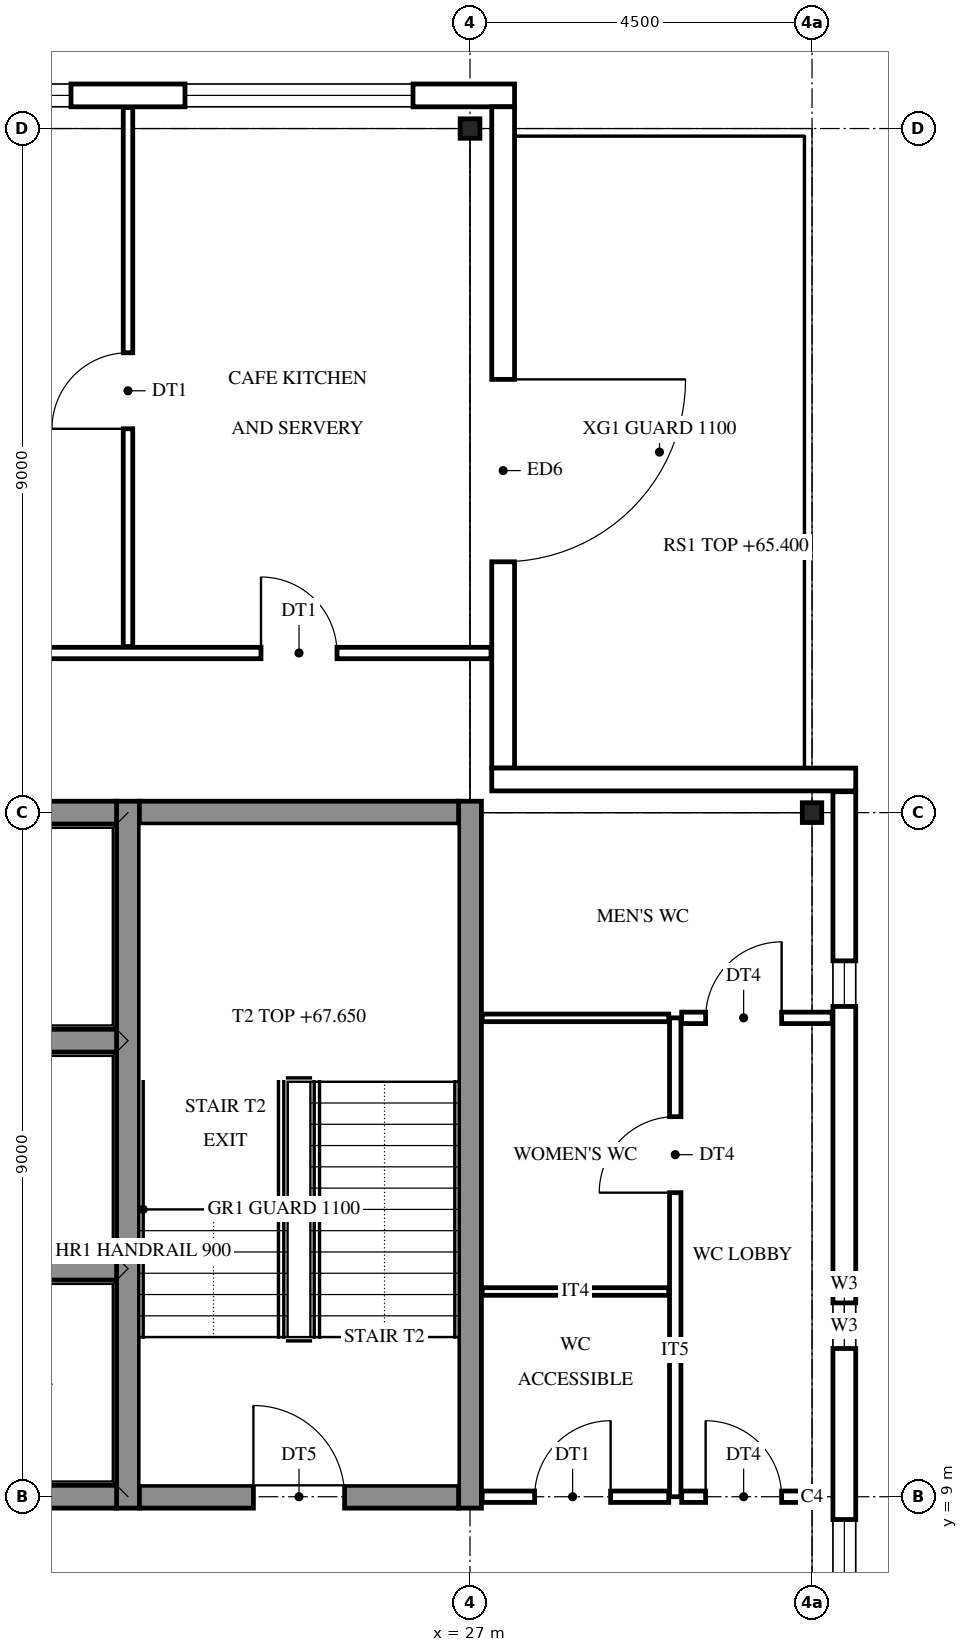
"""IFC4 building model, lengths in metres.
Left out: names, types, materials, properties, quantities, classifications, styles, units other than length and angle.
Written with IfcOpenShell. Run it as: python <this file> out.ifc"""

import sys

from ifc_helpers import new_model, si_unit, direction, frame, frame_2d, origin, origin_2d, place, context, subcontext, project, spatial, rectangle, i_section, extrude, element, fill, save


model = new_model("IFC4")
c1 = context("Model", 3, precision=1e-05, world=origin(), true_north=direction((0.0, 1.0)))
c2 = subcontext(c1, "Body", "Model", "MODEL_VIEW")
j1 = project(units=[si_unit("LENGTHUNIT", "METRE"), si_unit("PLANEANGLEUNIT", "RADIAN")], contexts=[c1])
p1 = place(None, origin())
s1 = spatial("IfcSite", under=j1, at=p1, CompositionType="ELEMENT")
p2 = place(p1, origin())
s2 = spatial("IfcBuilding", under=s1, at=p2, CompositionType="ELEMENT")
p3 = place(p2, frame((0.0, 0.0, 65.4)))
s3 = spatial("IfcBuildingStorey", under=s2, at=p3, CompositionType="ELEMENT", Elevation=65.4)
for number, where, z_axis, x_axis in (
    (1, (27.0, 27.0, 0.0), (0.0, 0.0, 1.0), (0.0, 1.0, 0.0)),
    (2, (31.5, 9.0, 0.0), (0.0, 0.0, 1.0), (1.0, 0.0, 0.0)),
    (3, (31.5, 18.0, 0.0), (0.0, 0.0, 1.0), (1.0, 0.0, 0.0)),
):
    element("IfcColumn", number, at=place(p3, frame(where, z_axis=z_axis, x_axis=x_axis)), inside=s3, PredefinedType="COLUMN", context=c2, shape_type="SweptSolid", body=[
        extrude(i_section(OverallWidth=0.256, OverallDepth=0.26, WebThickness=0.01, FlangeThickness=0.017, FilletRadius=0.014, at=origin_2d()), origin(), (0.0, 0.0, 1.0), 4.5),
    ])
for number, where, z_axis, x_axis in (
    (4, (22.5, 8.85, 0.0), (0.0, 0.0, 1.0), (0.0, 1.0, 0.0)),
    (5, (27.0, 8.85, 0.0), (0.0, 0.0, 1.0), (0.0, 1.0, 0.0)),
):
    element("IfcWall", number, at=place(p3, frame(where, z_axis=z_axis, x_axis=x_axis)), inside=s3, PredefinedType="SHEAR", context=c2, shape_type="SweptSolid", body=[
        extrude(rectangle(XDim=9.3, YDim=0.3, at=frame_2d((4.65, 0.0))), origin(), (0.0, 0.0, 1.0), 4.5),
    ])
p4 = place(p3, frame((19.65, 9.0, 0.0), z_axis=(0.0, 0.0, 1.0), x_axis=(1.0, 0.0, 0.0)))
e6 = element("IfcWall", 6, at=p4, inside=s3, PredefinedType="SHEAR", context=c2, shape_type="SweptSolid", body=[
    extrude(rectangle(XDim=2.7, YDim=0.3, at=frame_2d((1.35, 0.0))), origin(), (0.0, 0.0, 1.0), 4.5),
])
p5 = place(p3, frame((22.65, 9.0, 0.0), z_axis=(0.0, 0.0, 1.0), x_axis=(1.0, 0.0, 0.0)))
e7 = element("IfcWall", 7, at=p5, inside=s3, PredefinedType="SHEAR", context=c2, shape_type="SweptSolid", body=[
    extrude(rectangle(XDim=4.2, YDim=0.3, at=frame_2d((2.1, 0.0))), origin(), (0.0, 0.0, 1.0), 4.5),
])
p6 = place(p5, frame((1.5, 0.0, 0.0)))
e8 = element("IfcOpeningElement", 8, at=p6, cuts=e7, PredefinedType="OPENING", context=c2, shape_type="SweptSolid", body=[
    extrude(rectangle(XDim=1.2, YDim=2.1, at=frame_2d((0.6, 1.05))), frame((0.0, 0.16, 0.0), z_axis=(0.0, -1.0, 0.0), x_axis=(1.0, 0.0, 0.0)), (0.0, 0.0, 1.0), 0.32),
])
for number, where, z_axis, x_axis in (
    (9, (19.65, 12.0, 0.0), (0.0, 0.0, 1.0), (1.0, 0.0, 0.0)),
    (10, (19.65, 15.0, 0.0), (0.0, 0.0, 1.0), (1.0, 0.0, 0.0)),
    (11, (19.65, 18.0, 0.0), (0.0, 0.0, 1.0), (1.0, 0.0, 0.0)),
):
    element("IfcWall", number, at=place(p3, frame(where, z_axis=z_axis, x_axis=x_axis)), inside=s3, PredefinedType="SHEAR", context=c2, shape_type="SweptSolid", body=[
        extrude(rectangle(XDim=2.7, YDim=0.3, at=frame_2d((1.35, 0.0))), origin(), (0.0, 0.0, 1.0), 4.5),
    ])
p7 = place(p3, frame((22.65, 18.0, 0.0), z_axis=(0.0, 0.0, 1.0), x_axis=(1.0, 0.0, 0.0)))
e12 = element("IfcWall", 12, at=p7, inside=s3, PredefinedType="SHEAR", context=c2, shape_type="SweptSolid", body=[
    extrude(rectangle(XDim=4.2, YDim=0.3, at=frame_2d((2.1, 0.0))), origin(), (0.0, 0.0, 1.0), 4.5),
])
p8 = place(p3, frame((8.414, 27.436, 0.0), z_axis=(0.0, 0.0, 1.0), x_axis=(1.0, 0.0, 0.0)))
e13 = element("IfcWall", 13, at=p8, inside=s3, PredefinedType="STANDARD", context=c2, shape_type="SweptSolid", body=[
    extrude(rectangle(XDim=19.172, YDim=0.3, at=frame_2d((9.586, 0.0))), origin(), (0.0, 0.0, 1.0), 4.5),
])
p9 = place(p8, frame((1.336, 0.0, 0.6)))
e14 = element("IfcOpeningElement", 14, at=p9, cuts=e13, PredefinedType="OPENING", context=c2, shape_type="SweptSolid", body=[
    extrude(rectangle(XDim=3.0, YDim=3.1, at=frame_2d((1.5, 1.55))), frame((0.0, 0.16, 0.0), z_axis=(0.0, -1.0, 0.0), x_axis=(1.0, 0.0, 0.0)), (0.0, 0.0, 1.0), 0.32),
])
p10 = place(p8, frame((5.836, 0.0, 0.6)))
e15 = element("IfcOpeningElement", 15, at=p10, cuts=e13, PredefinedType="OPENING", context=c2, shape_type="SweptSolid", body=[
    extrude(rectangle(XDim=3.0, YDim=3.1, at=frame_2d((1.5, 1.55))), frame((0.0, 0.16, 0.0), z_axis=(0.0, -1.0, 0.0), x_axis=(1.0, 0.0, 0.0)), (0.0, 0.0, 1.0), 0.32),
])
p11 = place(p8, frame((10.336, 0.0, 0.6)))
e16 = element("IfcOpeningElement", 16, at=p11, cuts=e13, PredefinedType="OPENING", context=c2, shape_type="SweptSolid", body=[
    extrude(rectangle(XDim=3.0, YDim=3.1, at=frame_2d((1.5, 1.55))), frame((0.0, 0.16, 0.0), z_axis=(0.0, -1.0, 0.0), x_axis=(1.0, 0.0, 0.0)), (0.0, 0.0, 1.0), 0.32),
])
p12 = place(p8, frame((14.836, 0.0, 0.6)))
e17 = element("IfcOpeningElement", 17, at=p12, cuts=e13, PredefinedType="OPENING", context=c2, shape_type="SweptSolid", body=[
    extrude(rectangle(XDim=3.0, YDim=3.1, at=frame_2d((1.5, 1.55))), frame((0.0, 0.16, 0.0), z_axis=(0.0, -1.0, 0.0), x_axis=(1.0, 0.0, 0.0)), (0.0, 0.0, 1.0), 0.32),
])
p13 = place(p3, frame((27.436, 27.286, 0.0), z_axis=(0.0, 0.0, 1.0), x_axis=(0.0, -1.0, 0.0)))
e18 = element("IfcWall", 18, at=p13, inside=s3, PredefinedType="STANDARD", context=c2, shape_type="SweptSolid", body=[
    extrude(rectangle(XDim=8.7, YDim=0.3, at=frame_2d((4.35, 0.0))), origin(), (0.0, 0.0, 1.0), 4.5),
])
p14 = place(p13, frame((3.586, 0.0, 0.012)))
e19 = element("IfcOpeningElement", 19, at=p14, cuts=e18, PredefinedType="OPENING", context=c2, shape_type="SweptSolid", body=[
    extrude(rectangle(XDim=2.4, YDim=2.4, at=frame_2d((1.2, 1.2))), frame((0.0, 0.16, 0.0), z_axis=(0.0, -1.0, 0.0), x_axis=(1.0, 0.0, 0.0)), (0.0, 0.0, 1.0), 0.32),
])
p15 = place(p3, frame((27.286, 18.436, 0.0), z_axis=(0.0, 0.0, 1.0), x_axis=(1.0, 0.0, 0.0)))
e20 = element("IfcWall", 20, at=p15, inside=s3, PredefinedType="STANDARD", context=c2, shape_type="SweptSolid", body=[
    extrude(rectangle(XDim=4.789, YDim=0.3, at=frame_2d((2.395, 0.0))), origin(), (0.0, 0.0, 1.0), 4.5),
])
p16 = place(p3, frame((31.925, 18.275, 0.0), z_axis=(0.0, 0.0, 1.0), x_axis=(0.0, -1.0, 0.0)))
e21 = element("IfcWall", 21, at=p16, inside=s3, PredefinedType="STANDARD", context=c2, shape_type="SweptSolid", body=[
    extrude(rectangle(XDim=18.55, YDim=0.3, at=frame_2d((9.275, 0.0))), origin(), (0.0, 0.0, 1.0), 4.5),
])
p17 = place(p16, frame((17.075, 0.0, 0.6)))
e22 = element("IfcOpeningElement", 22, at=p17, cuts=e21, PredefinedType="OPENING", context=c2, shape_type="SweptSolid", body=[
    extrude(rectangle(XDim=0.9, YDim=2.3, at=frame_2d((0.45, 1.15))), frame((0.0, 0.16, 0.0), z_axis=(0.0, -1.0, 0.0), x_axis=(1.0, 0.0, 0.0)), (0.0, 0.0, 1.0), 0.32),
])
p18 = place(p16, frame((9.575, 0.0, 0.6)))
e23 = element("IfcOpeningElement", 23, at=p18, cuts=e21, PredefinedType="OPENING", context=c2, shape_type="SweptSolid", body=[
    extrude(rectangle(XDim=0.9, YDim=2.3, at=frame_2d((0.45, 1.15))), frame((0.0, 0.16, 0.0), z_axis=(0.0, -1.0, 0.0), x_axis=(1.0, 0.0, 0.0)), (0.0, 0.0, 1.0), 0.32),
])
p19 = place(p16, frame((6.725, 0.0, 1.6)))
e24 = element("IfcOpeningElement", 24, at=p19, cuts=e21, PredefinedType="OPENING", context=c2, shape_type="SweptSolid", body=[
    extrude(rectangle(XDim=0.6, YDim=0.9, at=frame_2d((0.3, 0.45))), frame((0.0, 0.16, 0.0), z_axis=(0.0, -1.0, 0.0), x_axis=(1.0, 0.0, 0.0)), (0.0, 0.0, 1.0), 0.32),
])
p20 = place(p16, frame((2.225, 0.0, 1.6)))
e25 = element("IfcOpeningElement", 25, at=p20, cuts=e21, PredefinedType="OPENING", context=c2, shape_type="SweptSolid", body=[
    extrude(rectangle(XDim=0.6, YDim=0.9, at=frame_2d((0.3, 0.45))), frame((0.0, 0.16, 0.0), z_axis=(0.0, -1.0, 0.0), x_axis=(1.0, 0.0, 0.0)), (0.0, 0.0, 1.0), 0.32),
])
p21 = place(p3, frame((22.5, 20.185, 0.0), z_axis=(0.0, 0.0, 1.0), x_axis=(0.0, 1.0, 0.0)))
e26 = element("IfcWall", 26, at=p21, inside=s3, PredefinedType="PARTITIONING", context=c2, shape_type="SweptSolid", body=[
    extrude(rectangle(XDim=7.091, YDim=0.125, at=frame_2d((3.545, 0.0))), origin(), (0.0, 0.0, 1.0), 3.723),
])
p22 = place(p21, frame((2.865, 0.0, 0.0)))
e27 = element("IfcOpeningElement", 27, at=p22, cuts=e26, PredefinedType="OPENING", context=c2, shape_type="SweptSolid", body=[
    extrude(rectangle(XDim=1.0, YDim=2.1, at=frame_2d((0.5, 1.05))), frame((0.0, 0.073, 0.0), z_axis=(0.0, -1.0, 0.0), x_axis=(1.0, 0.0, 0.0)), (0.0, 0.0, 1.0), 0.145),
])
p23 = place(p3, frame((29.7, 9.0, 0.0), z_axis=(0.0, 0.0, 1.0), x_axis=(0.0, 1.0, 0.0)))
e28 = element("IfcWall", 28, at=p23, inside=s3, PredefinedType="PARTITIONING", context=c2, shape_type="SweptSolid", body=[
    extrude(rectangle(XDim=6.3, YDim=0.15, at=frame_2d((3.15, 0.0))), origin(), (0.0, 0.0, 1.0), 3.723),
])
p24 = place(p23, frame((4.0, 0.0, 0.0)))
e29 = element("IfcOpeningElement", 29, at=p24, cuts=e28, PredefinedType="OPENING", context=c2, shape_type="SweptSolid", body=[
    extrude(rectangle(XDim=1.0, YDim=2.1, at=frame_2d((0.5, 1.05))), frame((0.0, 0.085, 0.0), z_axis=(0.0, -1.0, 0.0), x_axis=(1.0, 0.0, 0.0)), (0.0, 0.0, 1.0), 0.17),
])
p25 = place(p3, frame((27.16, 9.0, 0.0), z_axis=(0.0, 0.0, 1.0), x_axis=(1.0, 0.0, 0.0)))
e30 = element("IfcWall", 30, at=p25, inside=s3, PredefinedType="PARTITIONING", context=c2, shape_type="SweptSolid", body=[
    extrude(rectangle(XDim=2.455, YDim=0.15, at=frame_2d((1.228, 0.0))), origin(), (0.0, 0.0, 1.0), 3.723),
])
p26 = place(p25, frame((0.69, 0.0, 0.0)))
e31 = element("IfcOpeningElement", 31, at=p26, cuts=e30, PredefinedType="OPENING", context=c2, shape_type="SweptSolid", body=[
    extrude(rectangle(XDim=1.0, YDim=2.1, at=frame_2d((0.5, 1.05))), frame((0.0, 0.085, 0.0), z_axis=(0.0, -1.0, 0.0), x_axis=(1.0, 0.0, 0.0)), (0.0, 0.0, 1.0), 0.17),
])
p27 = place(p3, frame((29.785, 9.0, 0.0), z_axis=(0.0, 0.0, 1.0), x_axis=(1.0, 0.0, 0.0)))
e32 = element("IfcWall", 32, at=p27, inside=s3, PredefinedType="PARTITIONING", context=c2, shape_type="SweptSolid", body=[
    extrude(rectangle(XDim=1.577, YDim=0.15, at=frame_2d((0.789, 0.0))), origin(), (0.0, 0.0, 1.0), 3.723),
])
p28 = place(p27, frame((0.315, 0.0, 0.0)))
e33 = element("IfcOpeningElement", 33, at=p28, cuts=e32, PredefinedType="OPENING", context=c2, shape_type="SweptSolid", body=[
    extrude(rectangle(XDim=1.0, YDim=2.1, at=frame_2d((0.5, 1.05))), frame((0.0, 0.085, 0.0), z_axis=(0.0, -1.0, 0.0), x_axis=(1.0, 0.0, 0.0)), (0.0, 0.0, 1.0), 0.17),
])
for number, where, z_axis, x_axis in (
    (34, (27.16, 11.7, 0.0), (0.0, 0.0, 1.0), (1.0, 0.0, 0.0)),
    (35, (27.16, 15.3, 0.0), (0.0, 0.0, 1.0), (1.0, 0.0, 0.0)),
):
    element("IfcWall", number, at=place(p3, frame(where, z_axis=z_axis, x_axis=x_axis)), inside=s3, PredefinedType="PARTITIONING", context=c2, shape_type="SweptSolid", body=[
        extrude(rectangle(XDim=2.455, YDim=0.1, at=frame_2d((1.228, 0.0))), origin(), (0.0, 0.0, 1.0), 3.723),
    ])
p29 = place(p3, frame((29.785, 15.3, 0.0), z_axis=(0.0, 0.0, 1.0), x_axis=(1.0, 0.0, 0.0)))
e36 = element("IfcWall", 36, at=p29, inside=s3, PredefinedType="PARTITIONING", context=c2, shape_type="SweptSolid", body=[
    extrude(rectangle(XDim=1.98, YDim=0.15, at=frame_2d((0.99, 0.0))), origin(), (0.0, 0.0, 1.0), 3.723),
])
p30 = place(p29, frame((0.315, 0.0, 0.0)))
e37 = element("IfcOpeningElement", 37, at=p30, cuts=e36, PredefinedType="OPENING", context=c2, shape_type="SweptSolid", body=[
    extrude(rectangle(XDim=1.0, YDim=2.1, at=frame_2d((0.5, 1.05))), frame((0.0, 0.085, 0.0), z_axis=(0.0, -1.0, 0.0), x_axis=(1.0, 0.0, 0.0)), (0.0, 0.0, 1.0), 0.17),
])
p31 = place(p3, frame((8.724, 20.1, 0.0), z_axis=(0.0, 0.0, 1.0), x_axis=(1.0, 0.0, 0.0)))
e38 = element("IfcWall", 38, at=p31, inside=s3, PredefinedType="PARTITIONING", context=c2, shape_type="SweptSolid", body=[
    extrude(rectangle(XDim=18.552, YDim=0.15, at=frame_2d((9.276, 0.0))), origin(), (0.0, 0.0, 1.0), 3.723),
])
p32 = place(p31, frame((2.026, 0.0, 0.0)))
e39 = element("IfcOpeningElement", 39, at=p32, cuts=e38, PredefinedType="OPENING", context=c2, shape_type="SweptSolid", body=[
    extrude(rectangle(XDim=1.0, YDim=2.1, at=frame_2d((0.5, 1.05))), frame((0.0, 0.085, 0.0), z_axis=(0.0, -1.0, 0.0), x_axis=(1.0, 0.0, 0.0)), (0.0, 0.0, 1.0), 0.17),
])
p33 = place(p31, frame((8.776, 0.0, 0.0)))
e40 = element("IfcOpeningElement", 40, at=p33, cuts=e38, PredefinedType="OPENING", context=c2, shape_type="SweptSolid", body=[
    extrude(rectangle(XDim=1.0, YDim=2.1, at=frame_2d((0.5, 1.05))), frame((0.0, 0.085, 0.0), z_axis=(0.0, -1.0, 0.0), x_axis=(1.0, 0.0, 0.0)), (0.0, 0.0, 1.0), 0.17),
])
p34 = place(p31, frame((15.526, 0.0, 0.0)))
e41 = element("IfcOpeningElement", 41, at=p34, cuts=e38, PredefinedType="OPENING", context=c2, shape_type="SweptSolid", body=[
    extrude(rectangle(XDim=1.0, YDim=2.1, at=frame_2d((0.5, 1.05))), frame((0.0, 0.085, 0.0), z_axis=(0.0, -1.0, 0.0), x_axis=(1.0, 0.0, 0.0)), (0.0, 0.0, 1.0), 0.17),
])
p35 = place(p11, origin())
e42 = element("IfcWindow", 42, at=p35, inside=s3, PartitioningType="SINGLE_PANEL", PredefinedType="WINDOW", context=c2, shape_type="SweptSolid", body=[
    extrude(rectangle(XDim=3.0, YDim=3.1, at=frame_2d((1.5, 1.55))), frame((0.0, 0.03, 0.0), z_axis=(0.0, -1.0, 0.0), x_axis=(1.0, 0.0, 0.0)), (0.0, 0.0, 1.0), 0.06),
])
fill(e16, e42)
p36 = place(p12, origin())
e43 = element("IfcWindow", 43, at=p36, inside=s3, PartitioningType="SINGLE_PANEL", PredefinedType="WINDOW", context=c2, shape_type="SweptSolid", body=[
    extrude(rectangle(XDim=3.0, YDim=3.1, at=frame_2d((1.5, 1.55))), frame((0.0, 0.03, 0.0), z_axis=(0.0, -1.0, 0.0), x_axis=(1.0, 0.0, 0.0)), (0.0, 0.0, 1.0), 0.06),
])
fill(e17, e43)
p37 = place(p14, origin())
e44 = element("IfcDoor", 44, at=p37, inside=s3, OperationType="DOUBLE_DOOR_DOUBLE_SWING", PredefinedType="DOOR", context=c2, shape_type="SweptSolid", body=[
    extrude(rectangle(XDim=2.4, YDim=2.4, at=frame_2d((1.2, 1.2))), frame((0.0, 0.025, 0.0), z_axis=(0.0, -1.0, 0.0), x_axis=(1.0, 0.0, 0.0)), (0.0, 0.0, 1.0), 0.05),
])
fill(e19, e44)
p38 = place(p18, origin())
e45 = element("IfcWindow", 45, at=p38, inside=s3, PartitioningType="SINGLE_PANEL", PredefinedType="WINDOW", context=c2, shape_type="SweptSolid", body=[
    extrude(rectangle(XDim=0.9, YDim=2.3, at=frame_2d((0.45, 1.15))), frame((0.0, 0.03, 0.0), z_axis=(0.0, -1.0, 0.0), x_axis=(1.0, 0.0, 0.0)), (0.0, 0.0, 1.0), 0.06),
])
fill(e23, e45)
p39 = place(p19, origin())
e46 = element("IfcWindow", 46, at=p39, inside=s3, PartitioningType="SINGLE_PANEL", PredefinedType="WINDOW", context=c2, shape_type="SweptSolid", body=[
    extrude(rectangle(XDim=0.6, YDim=0.9, at=frame_2d((0.3, 0.45))), frame((0.0, 0.03, 0.0), z_axis=(0.0, -1.0, 0.0), x_axis=(1.0, 0.0, 0.0)), (0.0, 0.0, 1.0), 0.06),
])
fill(e24, e46)
p40 = place(p20, origin())
e47 = element("IfcWindow", 47, at=p40, inside=s3, PartitioningType="SINGLE_PANEL", PredefinedType="WINDOW", context=c2, shape_type="SweptSolid", body=[
    extrude(rectangle(XDim=0.6, YDim=0.9, at=frame_2d((0.3, 0.45))), frame((0.0, 0.03, 0.0), z_axis=(0.0, -1.0, 0.0), x_axis=(1.0, 0.0, 0.0)), (0.0, 0.0, 1.0), 0.06),
])
fill(e25, e47)
p41 = place(p6, origin())
e48 = element("IfcDoor", 48, at=p41, inside=s3, OperationType="SINGLE_SWING_LEFT", PredefinedType="DOOR", context=c2, shape_type="SweptSolid", body=[
    extrude(rectangle(XDim=1.2, YDim=2.1, at=frame_2d((0.6, 1.05))), frame((0.0, 0.025, 0.0), z_axis=(0.0, -1.0, 0.0), x_axis=(1.0, 0.0, 0.0)), (0.0, 0.0, 1.0), 0.05),
])
fill(e8, e48)
p42 = place(p26, origin())
e49 = element("IfcDoor", 49, at=p42, inside=s3, OperationType="SINGLE_SWING_RIGHT", PredefinedType="DOOR", context=c2, shape_type="SweptSolid", body=[
    extrude(rectangle(XDim=1.0, YDim=2.1, at=frame_2d((0.5, 1.05))), frame((0.0, 0.025, 0.0), z_axis=(0.0, -1.0, 0.0), x_axis=(1.0, 0.0, 0.0)), (0.0, 0.0, 1.0), 0.05),
])
fill(e31, e49)
p43 = place(p24, origin())
e50 = element("IfcDoor", 50, at=p43, inside=s3, OperationType="SINGLE_SWING_LEFT", PredefinedType="DOOR", context=c2, shape_type="SweptSolid", body=[
    extrude(rectangle(XDim=1.0, YDim=2.1, at=frame_2d((0.5, 1.05))), frame((0.0, 0.025, 0.0), z_axis=(0.0, -1.0, 0.0), x_axis=(1.0, 0.0, 0.0)), (0.0, 0.0, 1.0), 0.05),
])
fill(e29, e50)
p44 = place(p30, origin())
e51 = element("IfcDoor", 51, at=p44, inside=s3, OperationType="SINGLE_SWING_RIGHT", PredefinedType="DOOR", context=c2, shape_type="SweptSolid", body=[
    extrude(rectangle(XDim=1.0, YDim=2.1, at=frame_2d((0.5, 1.05))), frame((0.0, 0.025, 0.0), z_axis=(0.0, -1.0, 0.0), x_axis=(1.0, 0.0, 0.0)), (0.0, 0.0, 1.0), 0.05),
])
fill(e37, e51)
p45 = place(p28, origin())
e52 = element("IfcDoor", 52, at=p45, inside=s3, OperationType="SINGLE_SWING_LEFT", PredefinedType="DOOR", context=c2, shape_type="SweptSolid", body=[
    extrude(rectangle(XDim=1.0, YDim=2.1, at=frame_2d((0.5, 1.05))), frame((0.0, 0.025, 0.0), z_axis=(0.0, -1.0, 0.0), x_axis=(1.0, 0.0, 0.0)), (0.0, 0.0, 1.0), 0.05),
])
fill(e33, e52)
p46 = place(p34, origin())
e53 = element("IfcDoor", 53, at=p46, inside=s3, OperationType="SINGLE_SWING_LEFT", PredefinedType="DOOR", context=c2, shape_type="SweptSolid", body=[
    extrude(rectangle(XDim=1.0, YDim=2.1, at=frame_2d((0.5, 1.05))), frame((0.0, 0.025, 0.0), z_axis=(0.0, -1.0, 0.0), x_axis=(1.0, 0.0, 0.0)), (0.0, 0.0, 1.0), 0.05),
])
fill(e41, e53)
p47 = place(p22, frame((1.0, 0.0, 0.0), z_axis=(0.0, 0.0, 1.0), x_axis=(-1.0, 0.0, 0.0)))
e54 = element("IfcDoor", 54, at=p47, inside=s3, OperationType="SINGLE_SWING_LEFT", PredefinedType="DOOR", context=c2, shape_type="SweptSolid", body=[
    extrude(rectangle(XDim=1.0, YDim=2.1, at=frame_2d((0.5, 1.05))), frame((0.0, 0.025, 0.0), z_axis=(0.0, -1.0, 0.0), x_axis=(1.0, 0.0, 0.0)), (0.0, 0.0, 1.0), 0.05),
])
fill(e27, e54)
save(model, sys.argv[1])
